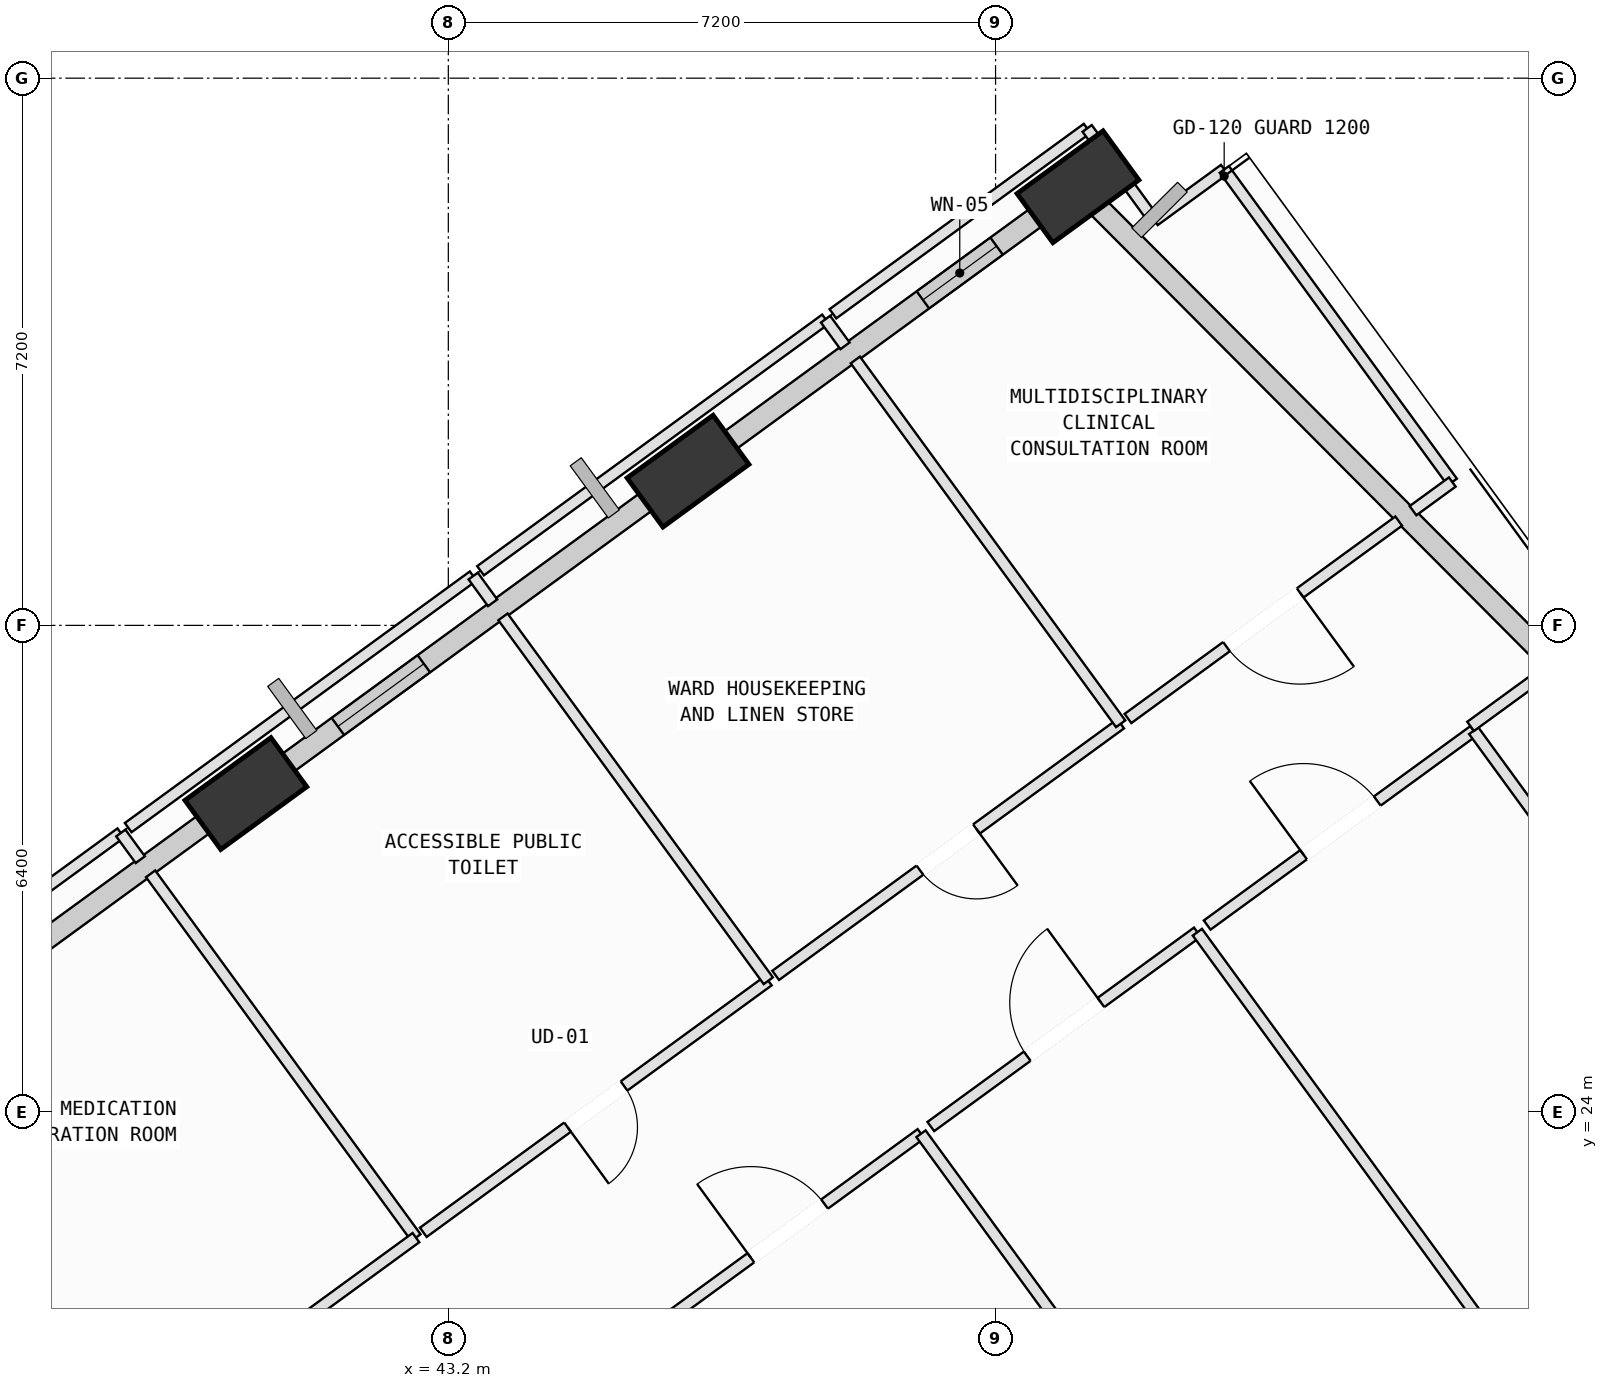
"""IFC4 building model, lengths in metres.
Left out: names, types, materials, properties, quantities, classifications, styles, units other than length and angle.
Written with IfcOpenShell. Run it as: python <this file> out.ifc"""

import sys

from ifc_helpers import new_model, si_unit, direction, frame, frame_2d, origin, origin_2d, place, context, subcontext, project, spatial, rectangle, extrude, element, fill, save


model = new_model("IFC4")
c1 = context("Model", 3, precision=1e-05, world=origin(), true_north=direction((0.0, 1.0)))
c2 = subcontext(c1, "Body", "Model", "MODEL_VIEW")
j1 = project(units=[si_unit("LENGTHUNIT", "METRE"), si_unit("PLANEANGLEUNIT", "RADIAN")], contexts=[c1])
p1 = place(None, origin())
s1 = spatial("IfcSite", under=j1, at=p1, CompositionType="ELEMENT")
p2 = place(p1, origin())
s2 = spatial("IfcBuilding", under=s1, at=p2, CompositionType="ELEMENT")
p3 = place(p2, frame((0.0, 0.0, 177.8)))
s3 = spatial("IfcBuildingStorey", under=s2, at=p3, CompositionType="ELEMENT", Elevation=177.8)
p4 = place(p3, frame((51.484, 36.171, 0.002), z_axis=(-0.047589899839, 0.073453975839, 0.996162494208), x_axis=(-0.358966865401, -0.931924623335, 0.051568265112)))
e1 = element("IfcColumn", 1, at=p4, inside=s3, PredefinedType="COLUMN", context=c2, shape_type="SweptSolid", body=[
    extrude(rectangle(XDim=1.4, YDim=0.8, at=origin_2d()), origin(), (0.0, 0.0, 1.0), 4.012),
])
p5 = place(p3, frame((46.354, 32.429, 0.002), z_axis=(-0.031951216067, 0.052499994339, 0.998109648479), x_axis=(-0.38448003414, -0.922422822753, 0.036211039923)))
e2 = element("IfcColumn", 2, at=p5, inside=s3, PredefinedType="COLUMN", context=c2, shape_type="SweptSolid", body=[
    extrude(rectangle(XDim=1.4, YDim=0.8, at=origin_2d()), origin(), (0.0, 0.0, 1.0), 4.004),
])
p6 = place(p3, frame((40.536, 28.187, 0.002), z_axis=(-0.014288016572, 0.028576033144, 0.999489501152), x_axis=(-0.459326015506, -0.888068274517, 0.018824220468)))
e3 = element("IfcColumn", 3, at=p6, inside=s3, PredefinedType="COLUMN", context=c2, shape_type="SweptSolid", body=[
    extrude(rectangle(XDim=1.4, YDim=0.8, at=origin_2d()), origin(), (0.0, 0.0, 1.0), 3.998),
])
p7 = place(p3, frame((51.712, 35.942, 0.0), z_axis=(0.0, 0.0, 1.0), x_axis=(0.705765695185, -0.708445328519, 0.0)))
e4 = element("IfcWall", 4, at=p7, inside=s3, PredefinedType="SOLIDWALL", context=c2, shape_type="SweptSolid", body=[
    extrude(rectangle(XDim=8.838, YDim=0.28, at=frame_2d((4.419, 0.0))), origin(), (0.0, 0.0, 1.0), 3.265),
])
p8 = place(p3, frame((46.75, 32.719, 0.0), z_axis=(0.0, 0.0, 1.0), x_axis=(0.807961830103, 0.589234826785, 0.0)))
e5 = element("IfcWall", 5, at=p8, inside=s3, PredefinedType="SOLIDWALL", context=c2, shape_type="SweptSolid", body=[
    extrude(rectangle(XDim=5.405, YDim=0.28, at=frame_2d((2.702, 0.0))), origin(), (0.0, 0.0, 1.0), 3.265),
])
p9 = place(p8, frame((3.334, 0.0, 0.75)))
e6 = element("IfcOpeningElement", 6, at=p9, cuts=e5, PredefinedType="OPENING", context=c2, shape_type="SweptSolid", body=[
    extrude(rectangle(XDim=1.2, YDim=1.75, at=frame_2d((0.6, 0.875))), frame((0.0, 0.15, 0.0), z_axis=(0.0, -1.0, 0.0), x_axis=(1.0, 0.0, 0.0)), (0.0, 0.0, 1.0), 0.3),
])
p10 = place(p3, frame((40.942, 28.483, 0.0), z_axis=(0.0, 0.0, 1.0), x_axis=(0.807987697301, 0.589199355915, 0.0)))
e7 = element("IfcWall", 7, at=p10, inside=s3, PredefinedType="SOLIDWALL", context=c2, shape_type="SweptSolid", body=[
    extrude(rectangle(XDim=6.227, YDim=0.28, at=frame_2d((3.113, 0.0))), origin(), (0.0, 0.0, 1.0), 3.065),
])
p11 = place(p10, frame((0.996, 0.0, 0.75)))
e8 = element("IfcOpeningElement", 8, at=p11, cuts=e7, PredefinedType="OPENING", context=c2, shape_type="SweptSolid", body=[
    extrude(rectangle(XDim=1.4, YDim=1.85, at=frame_2d((0.7, 0.925))), frame((0.0, 0.15, 0.0), z_axis=(0.0, -1.0, 0.0), x_axis=(1.0, 0.0, 0.0)), (0.0, 0.0, 1.0), 0.3),
])
p12 = place(p3, frame((35.129, 24.244, 0.0), z_axis=(0.0, 0.0, 1.0), x_axis=(0.808002852065, 0.589178573147, 0.0)))
e9 = element("IfcWall", 9, at=p12, inside=s3, PredefinedType="SOLIDWALL", context=c2, shape_type="SweptSolid", body=[
    extrude(rectangle(XDim=6.211, YDim=0.28, at=frame_2d((3.105, 0.0))), origin(), (0.0, 0.0, 1.0), 3.265),
])
p13 = place(p12, frame((1.524, 0.0, 0.75)))
e10 = element("IfcOpeningElement", 10, at=p13, cuts=e9, PredefinedType="OPENING", context=c2, shape_type="SweptSolid", body=[
    extrude(rectangle(XDim=1.8, YDim=2.05, at=frame_2d((0.9, 1.025))), frame((0.0, 0.15, 0.0), z_axis=(0.0, -1.0, 0.0), x_axis=(1.0, 0.0, 0.0)), (0.0, 0.0, 1.0), 0.3),
])
p14 = place(p3, frame((45.912, 21.154, 0.0), z_axis=(0.0, 0.0, 1.0), x_axis=(0.808027614648, 0.5891446121, 0.0)))
e11 = element("IfcWall", 11, at=p14, inside=s3, PredefinedType="PARTITIONING", context=c2, shape_type="SweptSolid", body=[
    extrude(rectangle(XDim=4.34, YDim=0.15, at=frame_2d((2.17, 0.0))), origin(), (0.0, 0.0, 1.0), 3.78),
])
p15 = place(p14, frame((1.57, 0.0, 0.0)))
e12 = element("IfcOpeningElement", 12, at=p15, cuts=e11, PredefinedType="OPENING", context=c2, shape_type="SweptSolid", body=[
    extrude(rectangle(XDim=1.2, YDim=2.15, at=frame_2d((0.6, 1.075))), frame((0.0, 0.085, 0.0), z_axis=(0.0, -1.0, 0.0), x_axis=(1.0, 0.0, 0.0)), (0.0, 0.0, 1.0), 0.17),
])
p16 = place(p3, frame((49.419, 23.711, 0.0), z_axis=(0.0, 0.0, 1.0), x_axis=(0.589193791038, -0.807991755281, 0.0)))
e13 = element("IfcWall", 13, at=p16, inside=s3, PredefinedType="PARTITIONING", context=c2, shape_type="SweptSolid", body=[
    extrude(rectangle(XDim=12.28, YDim=0.15, at=frame_2d((6.14, 0.0))), origin(), (0.0, 0.0, 1.0), 3.78),
])
p17 = place(p3, frame((49.548, 23.806, 0.0), z_axis=(0.0, 0.0, 1.0), x_axis=(0.808000835419, 0.589181338776, 0.0)))
e14 = element("IfcWall", 14, at=p17, inside=s3, PredefinedType="PARTITIONING", context=c2, shape_type="SweptSolid", body=[
    extrude(rectangle(XDim=4.34, YDim=0.15, at=frame_2d((2.17, 0.0))), origin(), (0.0, 0.0, 1.0), 3.065),
])
p18 = place(p17, frame((1.57, 0.0, 0.0)))
e15 = element("IfcOpeningElement", 15, at=p18, cuts=e14, PredefinedType="OPENING", context=c2, shape_type="SweptSolid", body=[
    extrude(rectangle(XDim=1.2, YDim=2.15, at=frame_2d((0.6, 1.075))), frame((0.0, 0.085, 0.0), z_axis=(0.0, -1.0, 0.0), x_axis=(1.0, 0.0, 0.0)), (0.0, 0.0, 1.0), 0.17),
])
p19 = place(p3, frame((53.055, 26.363, 0.0), z_axis=(0.0, 0.0, 1.0), x_axis=(0.589164923699, -0.808012804776, 0.0)))
e16 = element("IfcWall", 16, at=p19, inside=s3, PredefinedType="PARTITIONING", context=c2, shape_type="SweptSolid", body=[
    extrude(rectangle(XDim=11.936, YDim=0.15, at=frame_2d((5.968, 0.0))), origin(), (0.0, 0.0, 1.0), 3.78),
])
p20 = place(p3, frame((53.184, 26.457, 0.0), z_axis=(0.0, 0.0, 1.0), x_axis=(0.808027614648, 0.5891446121, 0.0)))
e17 = element("IfcWall", 17, at=p20, inside=s3, PredefinedType="PARTITIONING", context=c2, shape_type="SweptSolid", body=[
    extrude(rectangle(XDim=4.34, YDim=0.15, at=frame_2d((2.17, 0.0))), origin(), (0.0, 0.0, 1.0), 3.065),
])
p21 = place(p20, frame((1.57, 0.0, 0.0)))
e18 = element("IfcOpeningElement", 18, at=p21, cuts=e17, PredefinedType="OPENING", context=c2, shape_type="SweptSolid", body=[
    extrude(rectangle(XDim=1.2, YDim=2.15, at=frame_2d((0.6, 1.075))), frame((0.0, 0.085, 0.0), z_axis=(0.0, -1.0, 0.0), x_axis=(1.0, 0.0, 0.0)), (0.0, 0.0, 1.0), 0.17),
])
p22 = place(p3, frame((56.691, 29.014, 0.0), z_axis=(0.0, 0.0, 1.0), x_axis=(0.589193100836, -0.807992258582, 0.0)))
e19 = element("IfcWall", 19, at=p22, inside=s3, PredefinedType="PARTITIONING", context=c2, shape_type="SweptSolid", body=[
    extrude(rectangle(XDim=9.83, YDim=0.15, at=frame_2d((4.915, 0.0))), origin(), (0.0, 0.0, 1.0), 3.78),
])
p23 = place(p22, frame((4.485, 0.0, 0.0)))
e20 = element("IfcOpeningElement", 20, at=p23, cuts=e19, PredefinedType="OPENING", context=c2, shape_type="SweptSolid", body=[
    extrude(rectangle(XDim=0.86, YDim=2.06, at=frame_2d((0.43, 1.03))), frame((0.0, 0.085, 0.0), z_axis=(0.0, -1.0, 0.0), x_axis=(1.0, 0.0, 0.0)), (0.0, 0.0, 1.0), 0.17),
])
p24 = place(p3, frame((34.352, 24.358, 0.0), z_axis=(0.0, 0.0, 1.0), x_axis=(0.807979944468, 0.589209987473, 0.0)))
e21 = element("IfcWall", 21, at=p24, inside=s3, PredefinedType="PARTITIONING", context=c2, shape_type="SweptSolid", body=[
    extrude(rectangle(XDim=5.618, YDim=0.15, at=frame_2d((2.809, 0.0))), origin(), (0.0, 0.0, 1.0), 3.78),
])
p25 = place(p3, frame((38.891, 27.668, 0.0), z_axis=(0.0, 0.0, 1.0), x_axis=(0.588973394119, -0.808152424373, 0.0)))
e22 = element("IfcWall", 22, at=p25, inside=s3, PredefinedType="PARTITIONING", context=c2, shape_type="SweptSolid", body=[
    extrude(rectangle(XDim=0.434, YDim=0.15, at=frame_2d((0.217, 0.0))), origin(), (0.0, 0.0, 1.0), 3.78),
])
p26 = place(p3, frame((39.283, 27.131, 0.0), z_axis=(0.0, 0.0, 1.0), x_axis=(0.58921251088, -0.807978104296, 0.0)))
e23 = element("IfcWall", 23, at=p26, inside=s3, PredefinedType="PARTITIONING", context=c2, shape_type="SweptSolid", body=[
    extrude(rectangle(XDim=5.925, YDim=0.15, at=frame_2d((2.962, 0.0))), origin(), (0.0, 0.0, 1.0), 3.78),
])
p27 = place(p3, frame((42.774, 22.344, 0.0), z_axis=(0.0, 0.0, 1.0), x_axis=(-0.807867723335, -0.589363844831, 0.0)))
e24 = element("IfcWall", 24, at=p27, inside=s3, PredefinedType="PARTITIONING", context=c2, shape_type="SweptSolid", body=[
    extrude(rectangle(XDim=2.823, YDim=0.15, at=frame_2d((1.412, 0.0))), origin(), (0.0, 0.0, 1.0), 3.78),
])
p28 = place(p3, frame((47.41, 25.724, 0.0), z_axis=(0.0, 0.0, 1.0), x_axis=(-0.807964856264, -0.589230677275, 0.0)))
e25 = element("IfcWall", 25, at=p28, inside=s3, PredefinedType="PARTITIONING", context=c2, shape_type="SweptSolid", body=[
    extrude(rectangle(XDim=5.618, YDim=0.15, at=frame_2d((2.809, 0.0))), origin(), (0.0, 0.0, 1.0), 3.78),
])
p29 = place(p28, frame((2.349, 0.0, 0.0)))
e26 = element("IfcOpeningElement", 26, at=p29, cuts=e25, PredefinedType="OPENING", context=c2, shape_type="SweptSolid", body=[
    extrude(rectangle(XDim=0.92, YDim=2.1, at=frame_2d((0.46, 1.05))), frame((0.0, 0.085, 0.0), z_axis=(0.0, -1.0, 0.0), x_axis=(1.0, 0.0, 0.0)), (0.0, 0.0, 1.0), 0.17),
])
p30 = place(p3, frame((38.988, 27.739, 0.0), z_axis=(0.0, 0.0, 1.0), x_axis=(0.807979944468, 0.589209987473, 0.0)))
e27 = element("IfcWall", 27, at=p30, inside=s3, PredefinedType="PARTITIONING", context=c2, shape_type="SweptSolid", body=[
    extrude(rectangle(XDim=5.618, YDim=0.15, at=frame_2d((2.809, 0.0))), origin(), (0.0, 0.0, 1.0), 3.265),
])
p31 = place(p3, frame((43.527, 31.049, 0.0), z_axis=(0.0, 0.0, 1.0), x_axis=(0.587904822125, -0.808930108305, 0.0)))
e28 = element("IfcWall", 28, at=p31, inside=s3, PredefinedType="PARTITIONING", context=c2, shape_type="SweptSolid", body=[
    extrude(rectangle(XDim=0.435, YDim=0.15, at=frame_2d((0.218, 0.0))), origin(), (0.0, 0.0, 1.0), 3.78),
])
p32 = place(p3, frame((43.919, 30.512, 0.0), z_axis=(0.0, 0.0, 1.0), x_axis=(0.589153663483, -0.808021015076, 0.0)))
e29 = element("IfcWall", 29, at=p32, inside=s3, PredefinedType="PARTITIONING", context=c2, shape_type="SweptSolid", body=[
    extrude(rectangle(XDim=5.925, YDim=0.15, at=frame_2d((2.963, 0.0))), origin(), (0.0, 0.0, 1.0), 3.78),
])
p33 = place(p3, frame((52.046, 29.105, 0.0), z_axis=(0.0, 0.0, 1.0), x_axis=(-0.807964856264, -0.589230677275, 0.0)))
e30 = element("IfcWall", 30, at=p33, inside=s3, PredefinedType="PARTITIONING", context=c2, shape_type="SweptSolid", body=[
    extrude(rectangle(XDim=5.618, YDim=0.15, at=frame_2d((2.809, 0.0))), origin(), (0.0, 0.0, 1.0), 3.78),
])
p34 = place(p33, frame((2.349, 0.0, 0.0)))
e31 = element("IfcOpeningElement", 31, at=p34, cuts=e30, PredefinedType="OPENING", context=c2, shape_type="SweptSolid", body=[
    extrude(rectangle(XDim=0.92, YDim=2.1, at=frame_2d((0.46, 1.05))), frame((0.0, 0.085, 0.0), z_axis=(0.0, -1.0, 0.0), x_axis=(1.0, 0.0, 0.0)), (0.0, 0.0, 1.0), 0.17),
])
p35 = place(p3, frame((43.624, 31.119, 0.0), z_axis=(0.0, 0.0, 1.0), x_axis=(0.807979944468, 0.589209987473, 0.0)))
e32 = element("IfcWall", 32, at=p35, inside=s3, PredefinedType="PARTITIONING", context=c2, shape_type="SweptSolid", body=[
    extrude(rectangle(XDim=5.618, YDim=0.15, at=frame_2d((2.809, 0.0))), origin(), (0.0, 0.0, 1.0), 3.065),
])
p36 = place(p3, frame((48.163, 34.429, 0.0), z_axis=(0.0, 0.0, 1.0), x_axis=(0.588973394119, -0.808152424373, 0.0)))
e33 = element("IfcWall", 33, at=p36, inside=s3, PredefinedType="PARTITIONING", context=c2, shape_type="SweptSolid", body=[
    extrude(rectangle(XDim=0.434, YDim=0.15, at=frame_2d((0.217, 0.0))), origin(), (0.0, 0.0, 1.0), 3.78),
])
p37 = place(p3, frame((48.555, 33.892, 0.0), z_axis=(0.0, 0.0, 1.0), x_axis=(0.58921251088, -0.807978104296, 0.0)))
e34 = element("IfcWall", 34, at=p37, inside=s3, PredefinedType="PARTITIONING", context=c2, shape_type="SweptSolid", body=[
    extrude(rectangle(XDim=5.925, YDim=0.15, at=frame_2d((2.962, 0.0))), origin(), (0.0, 0.0, 1.0), 3.78),
])
p38 = place(p3, frame((52.489, 35.727, 0.0), z_axis=(0.0, 0.0, 1.0), x_axis=(0.807846068896, 0.589393526406, 0.0)))
e35 = element("IfcWall", 35, at=p38, inside=s3, PredefinedType="PARTITIONING", context=c2, shape_type="SweptSolid", body=[
    extrude(rectangle(XDim=1.14, YDim=0.15, at=frame_2d((0.57, 0.0))), origin(), (0.0, 0.0, 1.0), 3.78),
])
p39 = place(p3, frame((53.41, 36.399, 0.0), z_axis=(0.0, 0.0, 1.0), x_axis=(0.589163676768, -0.808013713978, 0.0)))
e36 = element("IfcWall", 36, at=p39, inside=s3, PredefinedType="PARTITIONING", context=c2, shape_type="SweptSolid", body=[
    extrude(rectangle(XDim=5.09, YDim=0.15, at=frame_2d((2.545, 0.0))), origin(), (0.0, 0.0, 1.0), 3.78),
])
p40 = place(p3, frame((56.409, 32.286, 0.0), z_axis=(0.0, 0.0, 1.0), x_axis=(-0.807943178847, -0.589260400633, 0.0)))
e37 = element("IfcWall", 37, at=p40, inside=s3, PredefinedType="PARTITIONING", context=c2, shape_type="SweptSolid", body=[
    extrude(rectangle(XDim=0.64, YDim=0.15, at=frame_2d((0.32, 0.0))), origin(), (0.0, 0.0, 1.0), 3.78),
])
p41 = place(p3, frame((55.704, 31.772, 0.0), z_axis=(0.0, 0.0, 1.0), x_axis=(-0.80804817544, -0.589116411389, 0.0)))
e38 = element("IfcWall", 38, at=p41, inside=s3, PredefinedType="PARTITIONING", context=c2, shape_type="SweptSolid", body=[
    extrude(rectangle(XDim=4.408, YDim=0.15, at=frame_2d((2.204, 0.0))), origin(), (0.0, 0.0, 1.0), 3.78),
])
p42 = place(p41, frame((1.604, 0.0, 0.0)))
e39 = element("IfcOpeningElement", 39, at=p42, cuts=e38, PredefinedType="OPENING", context=c2, shape_type="SweptSolid", body=[
    extrude(rectangle(XDim=1.2, YDim=2.15, at=frame_2d((0.6, 1.075))), frame((0.0, 0.085, 0.0), z_axis=(0.0, -1.0, 0.0), x_axis=(1.0, 0.0, 0.0)), (0.0, 0.0, 1.0), 0.17),
])
p43 = place(p3, frame((48.26, 34.5, 0.0), z_axis=(0.0, 0.0, 1.0), x_axis=(0.80801630368, 0.589160125083, 0.0)))
e40 = element("IfcWall", 40, at=p43, inside=s3, PredefinedType="PARTITIONING", context=c2, shape_type="SweptSolid", body=[
    extrude(rectangle(XDim=4.14, YDim=0.15, at=frame_2d((2.07, 0.0))), origin(), (0.0, 0.0, 1.0), 3.265),
])
p44 = place(p3, frame((51.605, 36.939, 0.0), z_axis=(0.0, 0.0, 1.0), x_axis=(0.589322677246, -0.807897754722, 0.0)))
e41 = element("IfcWall", 41, at=p44, inside=s3, PredefinedType="PARTITIONING", context=c2, shape_type="SweptSolid", body=[
    extrude(rectangle(XDim=1.5, YDim=0.15, at=frame_2d((0.75, 0.0))), origin(), (0.0, 0.0, 1.0), 3.265),
])
p45 = place(p3, frame((56.65, 29.071, 0.0), z_axis=(0.0, 0.0, 1.0), x_axis=(0.808052040035, 0.589111110569, 0.0)))
e42 = element("IfcWall", 42, at=p45, inside=s3, PredefinedType="PARTITIONING", context=c2, shape_type="SweptSolid", body=[
    extrude(rectangle(XDim=1.251, YDim=0.15, at=frame_2d((0.625, 0.0))), origin(), (0.0, 0.0, 1.0), 3.065),
])
p46 = place(p9, origin())
e43 = element("IfcWindow", 43, at=p46, inside=s3, PartitioningType="SINGLE_PANEL", PredefinedType="WINDOW", context=c2, shape_type="SweptSolid", body=[
    extrude(rectangle(XDim=1.2, YDim=1.75, at=frame_2d((0.6, 0.875))), frame((0.0, 0.03, 0.0), z_axis=(0.0, -1.0, 0.0), x_axis=(1.0, 0.0, 0.0)), (0.0, 0.0, 1.0), 0.06),
])
fill(e6, e43)
p47 = place(p11, origin())
e44 = element("IfcWindow", 44, at=p47, inside=s3, PartitioningType="SINGLE_PANEL", PredefinedType="WINDOW", context=c2, shape_type="SweptSolid", body=[
    extrude(rectangle(XDim=1.4, YDim=1.85, at=frame_2d((0.7, 0.925))), frame((0.0, 0.03, 0.0), z_axis=(0.0, -1.0, 0.0), x_axis=(1.0, 0.0, 0.0)), (0.0, 0.0, 1.0), 0.06),
])
fill(e8, e44)
p48 = place(p15, origin())
e45 = element("IfcDoor", 45, at=p48, inside=s3, OperationType="SINGLE_SWING_LEFT", PredefinedType="DOOR", context=c2, shape_type="SweptSolid", body=[
    extrude(rectangle(XDim=1.2, YDim=2.15, at=frame_2d((0.6, 1.075))), frame((0.0, 0.025, 0.0), z_axis=(0.0, -1.0, 0.0), x_axis=(1.0, 0.0, 0.0)), (0.0, 0.0, 1.0), 0.05),
])
fill(e12, e45)
p49 = place(p18, origin())
e46 = element("IfcDoor", 46, at=p49, inside=s3, OperationType="SINGLE_SWING_RIGHT", PredefinedType="DOOR", context=c2, shape_type="SweptSolid", body=[
    extrude(rectangle(XDim=1.2, YDim=2.15, at=frame_2d((0.6, 1.075))), frame((0.0, 0.025, 0.0), z_axis=(0.0, -1.0, 0.0), x_axis=(1.0, 0.0, 0.0)), (0.0, 0.0, 1.0), 0.05),
])
fill(e15, e46)
p50 = place(p21, origin())
e47 = element("IfcDoor", 47, at=p50, inside=s3, OperationType="SINGLE_SWING_LEFT", PredefinedType="DOOR", context=c2, shape_type="SweptSolid", body=[
    extrude(rectangle(XDim=1.2, YDim=2.15, at=frame_2d((0.6, 1.075))), frame((0.0, 0.025, 0.0), z_axis=(0.0, -1.0, 0.0), x_axis=(1.0, 0.0, 0.0)), (0.0, 0.0, 1.0), 0.05),
])
fill(e18, e47)
p51 = place(p29, origin())
e48 = element("IfcDoor", 48, at=p51, inside=s3, OperationType="SINGLE_SWING_RIGHT", PredefinedType="DOOR", context=c2, shape_type="SweptSolid", body=[
    extrude(rectangle(XDim=0.92, YDim=2.1, at=frame_2d((0.46, 1.05))), frame((0.0, 0.025, 0.0), z_axis=(0.0, -1.0, 0.0), x_axis=(1.0, 0.0, 0.0)), (0.0, 0.0, 1.0), 0.05),
])
fill(e26, e48)
p52 = place(p34, origin())
e49 = element("IfcDoor", 49, at=p52, inside=s3, OperationType="SINGLE_SWING_LEFT", PredefinedType="DOOR", context=c2, shape_type="SweptSolid", body=[
    extrude(rectangle(XDim=0.92, YDim=2.1, at=frame_2d((0.46, 1.05))), frame((0.0, 0.025, 0.0), z_axis=(0.0, -1.0, 0.0), x_axis=(1.0, 0.0, 0.0)), (0.0, 0.0, 1.0), 0.05),
])
fill(e31, e49)
p53 = place(p42, origin())
e50 = element("IfcDoor", 50, at=p53, inside=s3, OperationType="SINGLE_SWING_LEFT", PredefinedType="DOOR", context=c2, shape_type="SweptSolid", body=[
    extrude(rectangle(XDim=1.2, YDim=2.15, at=frame_2d((0.6, 1.075))), frame((0.0, 0.025, 0.0), z_axis=(0.0, -1.0, 0.0), x_axis=(1.0, 0.0, 0.0)), (0.0, 0.0, 1.0), 0.05),
])
fill(e39, e50)
save(model, sys.argv[1])
